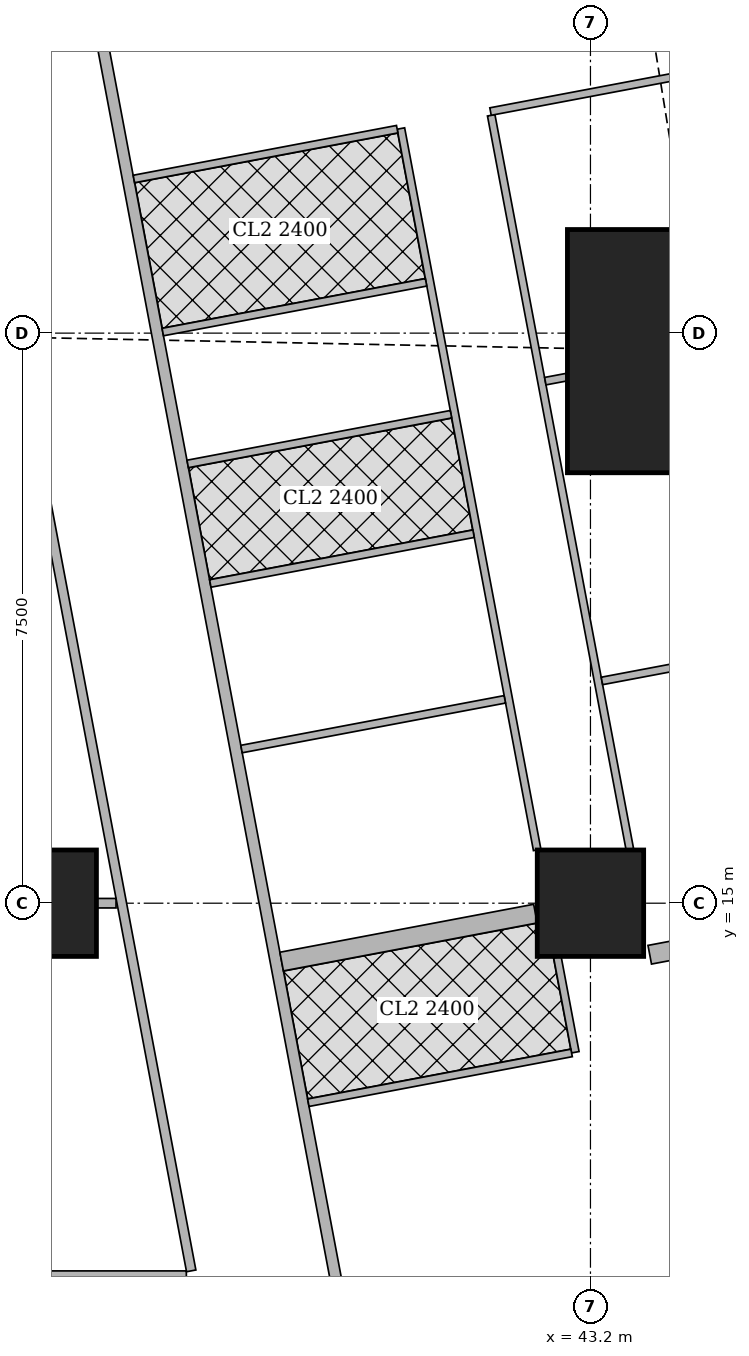
"""IFC4 building model, lengths in metres.
Left out: names, types, materials, properties, quantities, classifications, styles, units other than length and angle.
Written with IfcOpenShell. Run it as: python <this file> out.ifc"""

import sys

from ifc_helpers import new_model, si_unit, direction, frame, frame_2d, origin, origin_2d, place, context, subcontext, project, spatial, rectangle, extrude, element, fill, save


model = new_model("IFC4")
c1 = context("Model", 3, precision=1e-05, world=origin(), true_north=direction((0.0, 1.0)))
c2 = subcontext(c1, "Body", "Model", "MODEL_VIEW")
j1 = project(units=[si_unit("LENGTHUNIT", "METRE"), si_unit("PLANEANGLEUNIT", "RADIAN")], contexts=[c1])
p1 = place(None, origin())
s1 = spatial("IfcSite", under=j1, at=p1, CompositionType="ELEMENT")
p2 = place(p1, origin())
s2 = spatial("IfcBuilding", under=s1, at=p2, CompositionType="ELEMENT")
p3 = place(p2, frame((0.0, 0.0, 274.1)))
s3 = spatial("IfcBuildingStorey", under=s2, at=p3, CompositionType="ELEMENT", Elevation=274.1)
for number, where, z_axis, x_axis in (
    (1, (36.0, 15.0, 0.0), (0.0, 0.0, 1.0), (1.0, 0.0, 0.0)),
    (2, (43.2, 15.0, 0.0), (0.0, 0.0, 1.0), (1.0, 0.0, 0.0)),
):
    element("IfcColumn", number, at=place(p3, frame(where, z_axis=z_axis, x_axis=x_axis)), inside=s3, PredefinedType="COLUMN", context=c2, shape_type="SweptSolid", body=[
        extrude(rectangle(XDim=1.4, YDim=1.4, at=origin_2d()), origin(), (0.0, 0.0, 1.0), 3.75),
    ])
p4 = place(p3, frame((44.697, 22.263, 0.0), z_axis=(0.0, 0.0, 1.0), x_axis=(1.0, 0.0, 0.0)))
e3 = element("IfcColumn", 3, at=p4, inside=s3, PredefinedType="COLUMN", context=c2, shape_type="SweptSolid", body=[
    extrude(rectangle(XDim=3.6, YDim=3.2, at=origin_2d()), origin(), (0.0, 0.0, 1.0), 3.75),
])
p5 = place(p3, frame((49.684, 7.832, 0.0), z_axis=(0.0, 0.0, 1.0), x_axis=(-0.185616669694, 0.982622232565, 0.0)))
e4 = element("IfcWall", 4, at=p5, inside=s3, PredefinedType="SOLIDWALL", context=c2, shape_type="SweptSolid", body=[
    extrude(rectangle(XDim=36.0, YDim=0.2, at=frame_2d((18.0, 0.0))), origin(), (0.0, 0.0, 1.0), 3.5),
])
p6 = place(p5, frame((2.518, 0.0, 0.9)))
e5 = element("IfcOpeningElement", 5, at=p6, cuts=e4, PredefinedType="OPENING", context=c2, shape_type="SweptSolid", body=[
    extrude(rectangle(XDim=2.4, YDim=1.5, at=frame_2d((1.2, 0.75))), frame((0.0, 0.11, 0.0), z_axis=(0.0, -1.0, 0.0), x_axis=(1.0, 0.0, 0.0)), (0.0, 0.0, 1.0), 0.22),
])
p7 = place(p5, frame((8.444, 0.0, 0.9)))
e6 = element("IfcOpeningElement", 6, at=p7, cuts=e4, PredefinedType="OPENING", context=c2, shape_type="SweptSolid", body=[
    extrude(rectangle(XDim=1.8, YDim=1.5, at=frame_2d((0.9, 0.75))), frame((0.0, 0.11, 0.0), z_axis=(0.0, -1.0, 0.0), x_axis=(1.0, 0.0, 0.0)), (0.0, 0.0, 1.0), 0.22),
])
p8 = place(p5, frame((12.261, 0.0, 0.9)))
e7 = element("IfcOpeningElement", 7, at=p8, cuts=e4, PredefinedType="OPENING", context=c2, shape_type="SweptSolid", body=[
    extrude(rectangle(XDim=1.8, YDim=1.5, at=frame_2d((0.9, 0.75))), frame((0.0, 0.11, 0.0), z_axis=(0.0, -1.0, 0.0), x_axis=(1.0, 0.0, 0.0)), (0.0, 0.0, 1.0), 0.22),
])
p9 = place(p5, frame((16.078, 0.0, 0.9)))
e8 = element("IfcOpeningElement", 8, at=p9, cuts=e4, PredefinedType="OPENING", context=c2, shape_type="SweptSolid", body=[
    extrude(rectangle(XDim=1.8, YDim=1.5, at=frame_2d((0.9, 0.75))), frame((0.0, 0.11, 0.0), z_axis=(0.0, -1.0, 0.0), x_axis=(1.0, 0.0, 0.0)), (0.0, 0.0, 1.0), 0.22),
])
p10 = place(p5, frame((19.894, 0.0, 0.9)))
e9 = element("IfcOpeningElement", 9, at=p10, cuts=e4, PredefinedType="OPENING", context=c2, shape_type="SweptSolid", body=[
    extrude(rectangle(XDim=1.8, YDim=1.5, at=frame_2d((0.9, 0.75))), frame((0.0, 0.11, 0.0), z_axis=(0.0, -1.0, 0.0), x_axis=(1.0, 0.0, 0.0)), (0.0, 0.0, 1.0), 0.22),
])
p11 = place(p5, frame((23.71, 0.0, 0.9)))
e10 = element("IfcOpeningElement", 10, at=p11, cuts=e4, PredefinedType="OPENING", context=c2, shape_type="SweptSolid", body=[
    extrude(rectangle(XDim=1.8, YDim=1.5, at=frame_2d((0.9, 0.75))), frame((0.0, 0.11, 0.0), z_axis=(0.0, -1.0, 0.0), x_axis=(1.0, 0.0, 0.0)), (0.0, 0.0, 1.0), 0.22),
])
p12 = place(p5, frame((27.526, 0.0, 0.9)))
e11 = element("IfcOpeningElement", 11, at=p12, cuts=e4, PredefinedType="OPENING", context=c2, shape_type="SweptSolid", body=[
    extrude(rectangle(XDim=1.8, YDim=1.5, at=frame_2d((0.9, 0.75))), frame((0.0, 0.11, 0.0), z_axis=(0.0, -1.0, 0.0), x_axis=(1.0, 0.0, 0.0)), (0.0, 0.0, 1.0), 0.22),
])
p13 = place(p5, frame((32.046, 0.0, 0.9)))
e12 = element("IfcOpeningElement", 12, at=p13, cuts=e4, PredefinedType="OPENING", context=c2, shape_type="SweptSolid", body=[
    extrude(rectangle(XDim=1.8, YDim=1.5, at=frame_2d((0.9, 0.75))), frame((0.0, 0.11, 0.0), z_axis=(0.0, -1.0, 0.0), x_axis=(1.0, 0.0, 0.0)), (0.0, 0.0, 1.0), 0.22),
])
p14 = place(p3, frame((33.781, 42.186, 0.0), z_axis=(0.0, 0.0, 1.0), x_axis=(0.185593518645, -0.9826266055, 0.0)))
e13 = element("IfcWall", 13, at=p14, inside=s3, PredefinedType="SOLIDWALL", context=c2, shape_type="SweptSolid", body=[
    extrude(rectangle(XDim=35.961, YDim=0.15, at=frame_2d((17.98, 0.0))), origin(), (0.0, 0.0, 1.0), 2.5),
])
p15 = place(p14, frame((11.76, 0.0, 0.0)))
e14 = element("IfcOpeningElement", 14, at=p15, cuts=e13, PredefinedType="OPENING", context=c2, shape_type="SweptSolid", body=[
    extrude(rectangle(XDim=1.0, YDim=2.1, at=frame_2d((0.5, 1.05))), frame((0.0, 0.085, 0.0), z_axis=(0.0, -1.0, 0.0), x_axis=(1.0, 0.0, 0.0)), (0.0, 0.0, 1.0), 0.17),
])
p16 = place(p14, frame((15.576, 0.0, 0.0)))
e15 = element("IfcOpeningElement", 15, at=p16, cuts=e13, PredefinedType="OPENING", context=c2, shape_type="SweptSolid", body=[
    extrude(rectangle(XDim=1.0, YDim=2.1, at=frame_2d((0.5, 1.05))), frame((0.0, 0.085, 0.0), z_axis=(0.0, -1.0, 0.0), x_axis=(1.0, 0.0, 0.0)), (0.0, 0.0, 1.0), 0.17),
])
p17 = place(p14, frame((30.502, 0.0, 0.0)))
e16 = element("IfcOpeningElement", 16, at=p17, cuts=e13, PredefinedType="OPENING", context=c2, shape_type="SweptSolid", body=[
    extrude(rectangle(XDim=1.0, YDim=2.1, at=frame_2d((0.5, 1.05))), frame((0.0, 0.085, 0.0), z_axis=(0.0, -1.0, 0.0), x_axis=(1.0, 0.0, 0.0)), (0.0, 0.0, 1.0), 0.17),
])
p18 = place(p3, frame((41.894, 25.366, 0.0), z_axis=(0.0, 0.0, 1.0), x_axis=(0.185612905165, -0.982622943675, 0.0)))
e17 = element("IfcWall", 17, at=p18, inside=s3, PredefinedType="PARTITIONING", context=c2, shape_type="SweptSolid", body=[
    extrude(rectangle(XDim=9.827, YDim=0.1, at=frame_2d((4.913, 0.0))), origin(), (0.0, 0.0, 1.0), 2.5),
])
p19 = place(p18, frame((0.151, 0.0, 0.0)))
e18 = element("IfcOpeningElement", 18, at=p19, cuts=e17, PredefinedType="OPENING", context=c2, shape_type="SweptSolid", body=[
    extrude(rectangle(XDim=0.9, YDim=2.1, at=frame_2d((0.45, 1.05))), frame((0.0, 0.06, 0.0), z_axis=(0.0, -1.0, 0.0), x_axis=(1.0, 0.0, 0.0)), (0.0, 0.0, 1.0), 0.12),
])
p20 = place(p18, frame((5.05, 0.0, 0.0)))
e19 = element("IfcOpeningElement", 19, at=p20, cuts=e17, PredefinedType="OPENING", context=c2, shape_type="SweptSolid", body=[
    extrude(rectangle(XDim=0.9, YDim=2.1, at=frame_2d((0.45, 1.05))), frame((0.0, 0.06, 0.0), z_axis=(0.0, -1.0, 0.0), x_axis=(1.0, 0.0, 0.0)), (0.0, 0.0, 1.0), 0.12),
])
p21 = place(p18, frame((7.783, 0.0, 0.0)))
e20 = element("IfcOpeningElement", 20, at=p21, cuts=e17, PredefinedType="OPENING", context=c2, shape_type="SweptSolid", body=[
    extrude(rectangle(XDim=0.9, YDim=2.1, at=frame_2d((0.45, 1.05))), frame((0.0, 0.06, 0.0), z_axis=(0.0, -1.0, 0.0), x_axis=(1.0, 0.0, 0.0)), (0.0, 0.0, 1.0), 0.12),
])
p22 = place(p3, frame((40.706, 25.192, 0.0), z_axis=(0.0, 0.0, 1.0), x_axis=(0.185629824463, -0.982619747547, 0.0)))
e21 = element("IfcWall", 21, at=p22, inside=s3, PredefinedType="PARTITIONING", context=c2, shape_type="SweptSolid", body=[
    extrude(rectangle(XDim=9.659, YDim=0.1, at=frame_2d((4.83, 0.0))), origin(), (0.0, 0.0, 1.0), 2.5),
])
p23 = place(p22, frame((0.575, 0.0, 0.0)))
e22 = element("IfcOpeningElement", 22, at=p23, cuts=e21, PredefinedType="OPENING", context=c2, shape_type="SweptSolid", body=[
    extrude(rectangle(XDim=0.9, YDim=2.1, at=frame_2d((0.45, 1.05))), frame((0.0, 0.06, 0.0), z_axis=(0.0, -1.0, 0.0), x_axis=(1.0, 0.0, 0.0)), (0.0, 0.0, 1.0), 0.12),
])
p24 = place(p22, frame((4.166, 0.0, 0.0)))
e23 = element("IfcOpeningElement", 23, at=p24, cuts=e21, PredefinedType="OPENING", context=c2, shape_type="SweptSolid", body=[
    extrude(rectangle(XDim=0.9, YDim=2.1, at=frame_2d((0.45, 1.05))), frame((0.0, 0.06, 0.0), z_axis=(0.0, -1.0, 0.0), x_axis=(1.0, 0.0, 0.0)), (0.0, 0.0, 1.0), 0.12),
])
p25 = place(p22, frame((2.483, 0.0, 0.0)))
e24 = element("IfcOpeningElement", 24, at=p25, cuts=e21, PredefinedType="OPENING", context=c2, shape_type="SweptSolid", body=[
    extrude(rectangle(XDim=0.9, YDim=2.1, at=frame_2d((0.45, 1.05))), frame((0.0, 0.06, 0.0), z_axis=(0.0, -1.0, 0.0), x_axis=(1.0, 0.0, 0.0)), (0.0, 0.0, 1.0), 0.12),
])
p26 = place(p22, frame((6.074, 0.0, 0.0)))
e25 = element("IfcOpeningElement", 25, at=p26, cuts=e21, PredefinedType="OPENING", context=c2, shape_type="SweptSolid", body=[
    extrude(rectangle(XDim=0.9, YDim=2.1, at=frame_2d((0.45, 1.05))), frame((0.0, 0.06, 0.0), z_axis=(0.0, -1.0, 0.0), x_axis=(1.0, 0.0, 0.0)), (0.0, 0.0, 1.0), 0.12),
])
p27 = place(p3, frame((46.11, 26.213, 0.0), z_axis=(0.0, 0.0, 1.0), x_axis=(-0.982633535512, -0.185556823879, 0.0)))
e26 = element("IfcWall", 26, at=p27, inside=s3, PredefinedType="PARTITIONING", context=c2, shape_type="SweptSolid", body=[
    extrude(rectangle(XDim=4.3, YDim=0.1, at=frame_2d((2.15, 0.0))), origin(), (0.0, 0.0, 1.0), 2.5),
])
p28 = place(p3, frame((42.887, 21.921, 0.0), z_axis=(0.0, 0.0, 1.0), x_axis=(-0.982688058078, -0.185267861514, 0.0)))
e27 = element("IfcWall", 27, at=p28, inside=s3, PredefinedType="PARTITIONING", context=c2, shape_type="SweptSolid", body=[
    extrude(rectangle(XDim=0.286, YDim=0.1, at=frame_2d((0.143, 0.0))), origin(), (0.0, 0.0, 1.0), 2.5),
])
p29 = place(p3, frame((47.527, 18.712, 0.0), z_axis=(0.0, 0.0, 1.0), x_axis=(-0.982665405803, -0.185387972203, 0.0)))
e28 = element("IfcWall", 28, at=p29, inside=s3, PredefinedType="PARTITIONING", context=c2, shape_type="SweptSolid", body=[
    extrude(rectangle(XDim=4.25, YDim=0.1, at=frame_2d((2.125, 0.0))), origin(), (0.0, 0.0, 1.0), 2.5),
])
p30 = place(p3, frame((40.657, 25.183, 0.0), z_axis=(0.0, 0.0, 1.0), x_axis=(-0.982585626838, -0.185810349366, 0.0)))
e29 = element("IfcWall", 29, at=p30, inside=s3, PredefinedType="PARTITIONING", context=c2, shape_type="SweptSolid", body=[
    extrude(rectangle(XDim=3.525, YDim=0.1, at=frame_2d((1.763, 0.0))), origin(), (0.0, 0.0, 1.0), 3.5),
])
p31 = place(p3, frame((41.365, 21.433, 0.0), z_axis=(0.0, 0.0, 1.0), x_axis=(-0.982638553676, -0.185530247748, 0.0)))
e30 = element("IfcWall", 30, at=p31, inside=s3, PredefinedType="PARTITIONING", context=c2, shape_type="SweptSolid", body=[
    extrude(rectangle(XDim=3.525, YDim=0.1, at=frame_2d((1.763, 0.0))), origin(), (0.0, 0.0, 1.0), 3.5),
])
p32 = place(p3, frame((42.073, 17.682, 0.0), z_axis=(0.0, 0.0, 1.0), x_axis=(-0.98265117712, -0.185463376723, 0.0)))
e31 = element("IfcWall", 31, at=p32, inside=s3, PredefinedType="PARTITIONING", context=c2, shape_type="SweptSolid", body=[
    extrude(rectangle(XDim=3.525, YDim=0.1, at=frame_2d((1.763, 0.0))), origin(), (0.0, 0.0, 1.0), 3.5),
])
p33 = place(p32, frame((1.325, 0.0, 0.0)))
e32 = element("IfcOpeningElement", 32, at=p33, cuts=e31, PredefinedType="OPENING", context=c2, shape_type="SweptSolid", body=[
    extrude(rectangle(XDim=0.9, YDim=2.1, at=frame_2d((0.45, 1.05))), frame((0.0, 0.06, 0.0), z_axis=(0.0, -1.0, 0.0), x_axis=(1.0, 0.0, 0.0)), (0.0, 0.0, 1.0), 0.12),
])
p34 = place(p3, frame((41.037, 23.168, 0.0), z_axis=(0.0, 0.0, 1.0), x_axis=(-0.982638553676, -0.185530247748, 0.0)))
e33 = element("IfcWall", 33, at=p34, inside=s3, PredefinedType="PARTITIONING", context=c2, shape_type="SweptSolid", body=[
    extrude(rectangle(XDim=3.525, YDim=0.1, at=frame_2d((1.763, 0.0))), origin(), (0.0, 0.0, 1.0), 2.5),
])
p35 = place(p3, frame((41.662, 19.861, 0.0), z_axis=(0.0, 0.0, 1.0), x_axis=(-0.982588017646, -0.185797706064, 0.0)))
e34 = element("IfcWall", 34, at=p35, inside=s3, PredefinedType="PARTITIONING", context=c2, shape_type="SweptSolid", body=[
    extrude(rectangle(XDim=3.525, YDim=0.1, at=frame_2d((1.763, 0.0))), origin(), (0.0, 0.0, 1.0), 3.5),
])
p36 = place(p3, frame((42.765, 14.29, 0.0), z_axis=(0.0, 0.0, 1.0), x_axis=(0.185446293138, -0.982654401283, 0.0)))
e35 = element("IfcWall", 35, at=p36, inside=s3, PredefinedType="PARTITIONING", context=c2, shape_type="SweptSolid", body=[
    extrude(rectangle(XDim=1.273, YDim=0.1, at=frame_2d((0.636, 0.0))), origin(), (0.0, 0.0, 1.0), 3.5),
])
p37 = place(p3, frame((42.952, 13.03, 0.0), z_axis=(0.0, 0.0, 1.0), x_axis=(-0.982585626838, -0.185810349366, 0.0)))
e36 = element("IfcWall", 36, at=p37, inside=s3, PredefinedType="PARTITIONING", context=c2, shape_type="SweptSolid", body=[
    extrude(rectangle(XDim=3.525, YDim=0.1, at=frame_2d((1.763, 0.0))), origin(), (0.0, 0.0, 1.0), 3.5),
])
p38 = place(p37, frame((1.299, 0.0, 0.0)))
e37 = element("IfcOpeningElement", 37, at=p38, cuts=e36, PredefinedType="OPENING", context=c2, shape_type="SweptSolid", body=[
    extrude(rectangle(XDim=0.9, YDim=2.1, at=frame_2d((0.45, 1.05))), frame((0.0, 0.06, 0.0), z_axis=(0.0, -1.0, 0.0), x_axis=(1.0, 0.0, 0.0)), (0.0, 0.0, 1.0), 0.12),
])
p39 = place(p3, frame((45.29, 14.569, 0.0), z_axis=(0.0, 0.0, 1.0), x_axis=(-0.982676759201, -0.185327782391, 0.0)))
e38 = element("IfcWall", 38, at=p39, inside=s3, PredefinedType="SOLIDWALL", context=c2, shape_type="SweptSolid", body=[
    extrude(rectangle(XDim=1.333, YDim=0.25, at=frame_2d((0.667, 0.0))), origin(), (0.0, 0.0, 1.0), 3.5),
])
p40 = place(p3, frame((42.476, 14.863, 0.0), z_axis=(0.0, 0.0, 1.0), x_axis=(-0.982603567712, -0.185715450942, 0.0)))
e39 = element("IfcWall", 39, at=p40, inside=s3, PredefinedType="SOLIDWALL", context=c2, shape_type="SweptSolid", body=[
    extrude(rectangle(XDim=3.398, YDim=0.25, at=frame_2d((1.699, 0.0))), origin(), (0.0, 0.0, 1.0), 3.5),
])
p41 = place(p3, frame((28.95, 10.1, 0.0), z_axis=(0.0, 0.0, 1.0), x_axis=(1.0, 0.0, 0.0)))
e40 = element("IfcWall", 40, at=p41, inside=s3, PredefinedType="PARTITIONING", context=c2, shape_type="SweptSolid", body=[
    extrude(rectangle(XDim=8.933, YDim=0.125, at=frame_2d((4.467, 0.0))), origin(), (0.0, 0.0, 1.0), 3.5),
])
p42 = place(p3, frame((37.947, 10.163, 0.0), z_axis=(0.0, 0.0, 1.0), x_axis=(-0.185572770922, 0.982630523998, 0.0)))
e41 = element("IfcWall", 41, at=p42, inside=s3, PredefinedType="PARTITIONING", context=c2, shape_type="SweptSolid", body=[
    extrude(rectangle(XDim=25.111, YDim=0.125, at=frame_2d((12.556, 0.0))), origin(), (0.0, 0.0, 1.0), 2.5),
])
p43 = place(p42, frame((0.708, 0.0, 0.0)))
e42 = element("IfcOpeningElement", 42, at=p43, cuts=e41, PredefinedType="OPENING", context=c2, shape_type="SweptSolid", body=[
    extrude(rectangle(XDim=1.0, YDim=2.1, at=frame_2d((0.5, 1.05))), frame((0.0, 0.073, 0.0), z_axis=(0.0, -1.0, 0.0), x_axis=(1.0, 0.0, 0.0)), (0.0, 0.0, 1.0), 0.145),
])
p44 = place(p42, frame((5.9, 0.0, 0.0)))
e43 = element("IfcOpeningElement", 43, at=p44, cuts=e41, PredefinedType="OPENING", context=c2, shape_type="SweptSolid", body=[
    extrude(rectangle(XDim=1.0, YDim=2.1, at=frame_2d((0.5, 1.05))), frame((0.0, 0.073, 0.0), z_axis=(0.0, -1.0, 0.0), x_axis=(1.0, 0.0, 0.0)), (0.0, 0.0, 1.0), 0.145),
])
p45 = place(p42, frame((13.378, 0.0, 0.0)))
e44 = element("IfcOpeningElement", 44, at=p45, cuts=e41, PredefinedType="OPENING", context=c2, shape_type="SweptSolid", body=[
    extrude(rectangle(XDim=1.0, YDim=2.1, at=frame_2d((0.5, 1.05))), frame((0.0, 0.073, 0.0), z_axis=(0.0, -1.0, 0.0), x_axis=(1.0, 0.0, 0.0)), (0.0, 0.0, 1.0), 0.145),
])
p46 = place(p42, frame((21.15, 0.0, 0.0)))
e45 = element("IfcOpeningElement", 45, at=p46, cuts=e41, PredefinedType="OPENING", context=c2, shape_type="SweptSolid", body=[
    extrude(rectangle(XDim=1.0, YDim=2.1, at=frame_2d((0.5, 1.05))), frame((0.0, 0.073, 0.0), z_axis=(0.0, -1.0, 0.0), x_axis=(1.0, 0.0, 0.0)), (0.0, 0.0, 1.0), 0.145),
])
p47 = place(p3, frame((36.701, 15.0, 0.0), z_axis=(0.0, 0.0, 1.0), x_axis=(1.0, 0.0, 0.0)))
e46 = element("IfcWall", 46, at=p47, inside=s3, PredefinedType="PARTITIONING", context=c2, shape_type="SweptSolid", body=[
    extrude(rectangle(XDim=0.257, YDim=0.125, at=frame_2d((0.128, 0.0))), origin(), (0.0, 0.0, 1.0), 3.5),
])
p48 = place(p19, origin())
e47 = element("IfcDoor", 47, at=p48, inside=s3, OperationType="SINGLE_SWING_LEFT", PredefinedType="DOOR", context=c2, shape_type="SweptSolid", body=[
    extrude(rectangle(XDim=0.9, YDim=2.1, at=frame_2d((0.45, 1.05))), frame((0.0, 0.025, 0.0), z_axis=(0.0, -1.0, 0.0), x_axis=(1.0, 0.0, 0.0)), (0.0, 0.0, 1.0), 0.05),
])
fill(e18, e47)
p49 = place(p20, origin())
e48 = element("IfcDoor", 48, at=p49, inside=s3, OperationType="SINGLE_SWING_LEFT", PredefinedType="DOOR", context=c2, shape_type="SweptSolid", body=[
    extrude(rectangle(XDim=0.9, YDim=2.1, at=frame_2d((0.45, 1.05))), frame((0.0, 0.025, 0.0), z_axis=(0.0, -1.0, 0.0), x_axis=(1.0, 0.0, 0.0)), (0.0, 0.0, 1.0), 0.05),
])
fill(e19, e48)
p50 = place(p21, origin())
e49 = element("IfcDoor", 49, at=p50, inside=s3, OperationType="SINGLE_SWING_LEFT", PredefinedType="DOOR", context=c2, shape_type="SweptSolid", body=[
    extrude(rectangle(XDim=0.9, YDim=2.1, at=frame_2d((0.45, 1.05))), frame((0.0, 0.025, 0.0), z_axis=(0.0, -1.0, 0.0), x_axis=(1.0, 0.0, 0.0)), (0.0, 0.0, 1.0), 0.05),
])
fill(e20, e49)
p51 = place(p23, origin())
e50 = element("IfcDoor", 50, at=p51, inside=s3, OperationType="SINGLE_SWING_RIGHT", PredefinedType="DOOR", context=c2, shape_type="SweptSolid", body=[
    extrude(rectangle(XDim=0.9, YDim=2.1, at=frame_2d((0.45, 1.05))), frame((0.0, 0.025, 0.0), z_axis=(0.0, -1.0, 0.0), x_axis=(1.0, 0.0, 0.0)), (0.0, 0.0, 1.0), 0.05),
])
fill(e22, e50)
p52 = place(p24, origin())
e51 = element("IfcDoor", 51, at=p52, inside=s3, OperationType="SINGLE_SWING_RIGHT", PredefinedType="DOOR", context=c2, shape_type="SweptSolid", body=[
    extrude(rectangle(XDim=0.9, YDim=2.1, at=frame_2d((0.45, 1.05))), frame((0.0, 0.025, 0.0), z_axis=(0.0, -1.0, 0.0), x_axis=(1.0, 0.0, 0.0)), (0.0, 0.0, 1.0), 0.05),
])
fill(e23, e51)
p53 = place(p25, origin())
e52 = element("IfcDoor", 52, at=p53, inside=s3, OperationType="SINGLE_SWING_RIGHT", PredefinedType="DOOR", context=c2, shape_type="SweptSolid", body=[
    extrude(rectangle(XDim=0.9, YDim=2.1, at=frame_2d((0.45, 1.05))), frame((0.0, 0.025, 0.0), z_axis=(0.0, -1.0, 0.0), x_axis=(1.0, 0.0, 0.0)), (0.0, 0.0, 1.0), 0.05),
])
fill(e24, e52)
p54 = place(p26, origin())
e53 = element("IfcDoor", 53, at=p54, inside=s3, OperationType="SINGLE_SWING_LEFT", PredefinedType="DOOR", context=c2, shape_type="SweptSolid", body=[
    extrude(rectangle(XDim=0.9, YDim=2.1, at=frame_2d((0.45, 1.05))), frame((0.0, 0.025, 0.0), z_axis=(0.0, -1.0, 0.0), x_axis=(1.0, 0.0, 0.0)), (0.0, 0.0, 1.0), 0.05),
])
fill(e25, e53)
p55 = place(p16, origin())
e54 = element("IfcDoor", 54, at=p55, inside=s3, OperationType="SINGLE_SWING_RIGHT", PredefinedType="DOOR", context=c2, shape_type="SweptSolid", body=[
    extrude(rectangle(XDim=1.0, YDim=2.1, at=frame_2d((0.5, 1.05))), frame((0.0, 0.025, 0.0), z_axis=(0.0, -1.0, 0.0), x_axis=(1.0, 0.0, 0.0)), (0.0, 0.0, 1.0), 0.05),
])
fill(e15, e54)
p56 = place(p38, origin())
e55 = element("IfcDoor", 55, at=p56, inside=s3, OperationType="SINGLE_SWING_RIGHT", PredefinedType="DOOR", context=c2, shape_type="SweptSolid", body=[
    extrude(rectangle(XDim=0.9, YDim=2.1, at=frame_2d((0.45, 1.05))), frame((0.0, 0.025, 0.0), z_axis=(0.0, -1.0, 0.0), x_axis=(1.0, 0.0, 0.0)), (0.0, 0.0, 1.0), 0.05),
])
fill(e37, e55)
p57 = place(p17, origin())
e56 = element("IfcDoor", 56, at=p57, inside=s3, OperationType="SINGLE_SWING_LEFT", PredefinedType="DOOR", context=c2, shape_type="SweptSolid", body=[
    extrude(rectangle(XDim=1.0, YDim=2.1, at=frame_2d((0.5, 1.05))), frame((0.0, 0.025, 0.0), z_axis=(0.0, -1.0, 0.0), x_axis=(1.0, 0.0, 0.0)), (0.0, 0.0, 1.0), 0.05),
])
fill(e16, e56)
p58 = place(p33, origin())
e57 = element("IfcDoor", 57, at=p58, inside=s3, OperationType="SINGLE_SWING_RIGHT", PredefinedType="DOOR", context=c2, shape_type="SweptSolid", body=[
    extrude(rectangle(XDim=0.9, YDim=2.1, at=frame_2d((0.45, 1.05))), frame((0.0, 0.025, 0.0), z_axis=(0.0, -1.0, 0.0), x_axis=(1.0, 0.0, 0.0)), (0.0, 0.0, 1.0), 0.05),
])
fill(e32, e57)
p59 = place(p43, origin())
e58 = element("IfcDoor", 58, at=p59, inside=s3, OperationType="SINGLE_SWING_LEFT", PredefinedType="DOOR", context=c2, shape_type="SweptSolid", body=[
    extrude(rectangle(XDim=1.0, YDim=2.1, at=frame_2d((0.5, 1.05))), frame((0.0, 0.025, 0.0), z_axis=(0.0, -1.0, 0.0), x_axis=(1.0, 0.0, 0.0)), (0.0, 0.0, 1.0), 0.05),
])
fill(e42, e58)
p60 = place(p44, origin())
e59 = element("IfcDoor", 59, at=p60, inside=s3, OperationType="SINGLE_SWING_LEFT", PredefinedType="DOOR", context=c2, shape_type="SweptSolid", body=[
    extrude(rectangle(XDim=1.0, YDim=2.1, at=frame_2d((0.5, 1.05))), frame((0.0, 0.025, 0.0), z_axis=(0.0, -1.0, 0.0), x_axis=(1.0, 0.0, 0.0)), (0.0, 0.0, 1.0), 0.05),
])
fill(e43, e59)
save(model, sys.argv[1])
